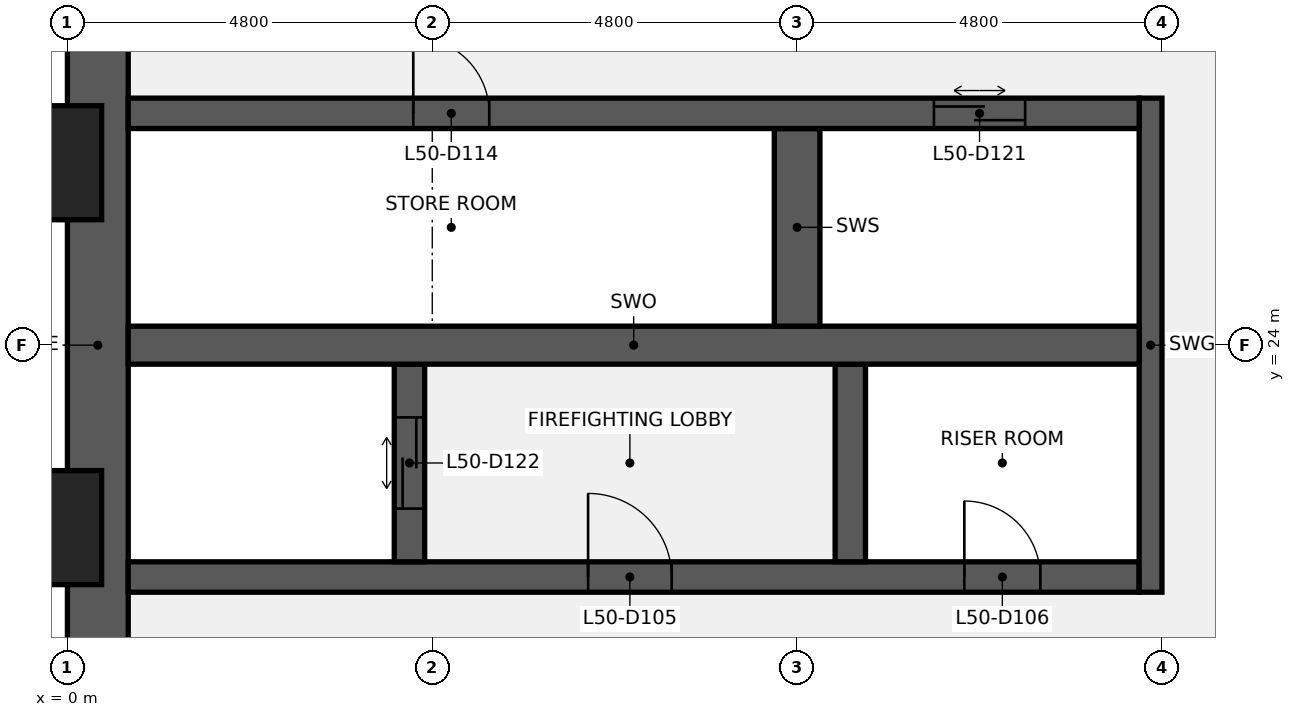
"""IFC4 building model, lengths in metres.
Left out: names, types, materials, properties, quantities, classifications, styles, units other than length and angle.
Written with IfcOpenShell. Run it as: python <this file> out.ifc"""

import sys

from ifc_helpers import new_model, si_unit, direction, frame, frame_2d, origin, origin_2d, place, context, subcontext, project, spatial, rectangle, extrude, element, fill, save


model = new_model("IFC4")
c1 = context("Model", 3, precision=1e-05, world=origin(), true_north=direction((0.0, 1.0)))
c2 = subcontext(c1, "Body", "Model", "MODEL_VIEW")
j1 = project(units=[si_unit("LENGTHUNIT", "METRE"), si_unit("PLANEANGLEUNIT", "RADIAN")], contexts=[c1])
p1 = place(None, origin())
s1 = spatial("IfcSite", under=j1, at=p1, CompositionType="ELEMENT")
p2 = place(p1, origin())
s2 = spatial("IfcBuilding", under=s1, at=p2, CompositionType="ELEMENT")
p3 = place(p2, frame((0.0, 0.0, 229.2)))
s3 = spatial("IfcBuildingStorey", under=s2, at=p3, CompositionType="ELEMENT", Elevation=229.2)
p4 = place(p3, frame((0.4, 9.6, 0.0), z_axis=(0.0, 0.0, 1.0), x_axis=(0.0, 1.0, 0.0)))
e1 = element("IfcWall", 1, at=p4, inside=s3, PredefinedType="SHEAR", context=c2, shape_type="SweptSolid", body=[
    extrude(rectangle(XDim=28.8, YDim=0.8, at=frame_2d((14.4, 0.0))), origin(), (0.0, 0.0, 1.0), 3.84),
])
p5 = place(p4, frame((8.85, 0.0, 0.9)))
e2 = element("IfcOpeningElement", 2, at=p5, cuts=e1, PredefinedType="OPENING", context=c2, shape_type="SweptSolid", body=[
    extrude(rectangle(XDim=1.5, YDim=1.5, at=frame_2d((0.75, 0.75))), frame((0.0, 0.41, 0.0), z_axis=(0.0, -1.0, 0.0), x_axis=(1.0, 0.0, 0.0)), (0.0, 0.0, 1.0), 0.82),
])
p6 = place(p4, frame((18.45, 0.0, 0.9)))
e3 = element("IfcOpeningElement", 3, at=p6, cuts=e1, PredefinedType="OPENING", context=c2, shape_type="SweptSolid", body=[
    extrude(rectangle(XDim=1.5, YDim=1.5, at=frame_2d((0.75, 0.75))), frame((0.0, 0.41, 0.0), z_axis=(0.0, -1.0, 0.0), x_axis=(1.0, 0.0, 0.0)), (0.0, 0.0, 1.0), 0.82),
])
p7 = place(p3, frame((0.8, 20.95, 0.0), z_axis=(0.0, 0.0, 1.0), x_axis=(1.0, 0.0, 0.0)))
e4 = element("IfcWall", 4, at=p7, inside=s3, PredefinedType="SHEAR", context=c2, shape_type="SweptSolid", body=[
    extrude(rectangle(XDim=13.3, YDim=0.4, at=frame_2d((6.65, 0.0))), origin(), (0.0, 0.0, 1.0), 3.84),
])
p8 = place(p7, frame((6.05, 0.0, 0.0)))
e5 = element("IfcOpeningElement", 5, at=p8, cuts=e4, PredefinedType="OPENING", context=c2, shape_type="SweptSolid", body=[
    extrude(rectangle(XDim=1.1, YDim=2.1, at=frame_2d((0.55, 1.05))), frame((0.0, 0.21, 0.0), z_axis=(0.0, -1.0, 0.0), x_axis=(1.0, 0.0, 0.0)), (0.0, 0.0, 1.0), 0.42),
])
p9 = place(p7, frame((11.0, 0.0, 0.0)))
e6 = element("IfcOpeningElement", 6, at=p9, cuts=e4, PredefinedType="OPENING", context=c2, shape_type="SweptSolid", body=[
    extrude(rectangle(XDim=1.0, YDim=2.1, at=frame_2d((0.5, 1.05))), frame((0.0, 0.21, 0.0), z_axis=(0.0, -1.0, 0.0), x_axis=(1.0, 0.0, 0.0)), (0.0, 0.0, 1.0), 0.42),
])
p10 = place(p3, frame((14.25, 20.75, 0.0), z_axis=(0.0, 0.0, 1.0), x_axis=(0.0, 1.0, 0.0)))
e7 = element("IfcWall", 7, at=p10, inside=s3, PredefinedType="SHEAR", context=c2, shape_type="SweptSolid", body=[
    extrude(rectangle(XDim=6.5, YDim=0.3, at=frame_2d((3.25, 0.0))), origin(), (0.0, 0.0, 1.0), 3.84),
])
p11 = place(p3, frame((4.5, 21.15, 0.0), z_axis=(0.0, 0.0, 1.0), x_axis=(0.0, 1.0, 0.0)))
e8 = element("IfcWall", 8, at=p11, inside=s3, PredefinedType="SHEAR", context=c2, shape_type="SweptSolid", body=[
    extrude(rectangle(XDim=2.6, YDim=0.4, at=frame_2d((1.3, 0.0))), origin(), (0.0, 0.0, 1.0), 3.84),
])
p12 = place(p11, frame((0.7, 0.0, 0.0)))
e9 = element("IfcOpeningElement", 9, at=p12, cuts=e8, PredefinedType="OPENING", context=c2, shape_type="SweptSolid", body=[
    extrude(rectangle(XDim=1.2, YDim=2.1, at=frame_2d((0.6, 1.05))), frame((0.0, 0.21, 0.0), z_axis=(0.0, -1.0, 0.0), x_axis=(1.0, 0.0, 0.0)), (0.0, 0.0, 1.0), 0.42),
])
p13 = place(p3, frame((10.3, 21.15, 0.0), z_axis=(0.0, 0.0, 1.0), x_axis=(0.0, 1.0, 0.0)))
e10 = element("IfcWall", 10, at=p13, inside=s3, PredefinedType="SHEAR", context=c2, shape_type="SweptSolid", body=[
    extrude(rectangle(XDim=2.6, YDim=0.4, at=frame_2d((1.3, 0.0))), origin(), (0.0, 0.0, 1.0), 3.84),
])
p14 = place(p3, frame((0.8, 24.0, 0.0), z_axis=(0.0, 0.0, 1.0), x_axis=(1.0, 0.0, 0.0)))
e11 = element("IfcWall", 11, at=p14, inside=s3, PredefinedType="SHEAR", context=c2, shape_type="SweptSolid", body=[
    extrude(rectangle(XDim=13.3, YDim=0.5, at=frame_2d((6.65, 0.0))), origin(), (0.0, 0.0, 1.0), 3.84),
])
p15 = place(p3, frame((9.6, 24.25, 0.0), z_axis=(0.0, 0.0, 1.0), x_axis=(0.0, 1.0, 0.0)))
e12 = element("IfcWall", 12, at=p15, inside=s3, PredefinedType="SHEAR", context=c2, shape_type="SweptSolid", body=[
    extrude(rectangle(XDim=2.6, YDim=0.6, at=frame_2d((1.3, 0.0))), origin(), (0.0, 0.0, 1.0), 3.84),
])
p16 = place(p3, frame((0.8, 27.05, 0.0), z_axis=(0.0, 0.0, 1.0), x_axis=(1.0, 0.0, 0.0)))
e13 = element("IfcWall", 13, at=p16, inside=s3, PredefinedType="SHEAR", context=c2, shape_type="SweptSolid", body=[
    extrude(rectangle(XDim=13.3, YDim=0.4, at=frame_2d((6.65, 0.0))), origin(), (0.0, 0.0, 1.0), 3.84),
])
p17 = place(p16, frame((3.75, 0.0, 0.0)))
e14 = element("IfcOpeningElement", 14, at=p17, cuts=e13, PredefinedType="OPENING", context=c2, shape_type="SweptSolid", body=[
    extrude(rectangle(XDim=1.0, YDim=2.1, at=frame_2d((0.5, 1.05))), frame((0.0, 0.21, 0.0), z_axis=(0.0, -1.0, 0.0), x_axis=(1.0, 0.0, 0.0)), (0.0, 0.0, 1.0), 0.42),
])
p18 = place(p16, frame((10.6, 0.0, 0.0)))
e15 = element("IfcOpeningElement", 15, at=p18, cuts=e13, PredefinedType="OPENING", context=c2, shape_type="SweptSolid", body=[
    extrude(rectangle(XDim=1.2, YDim=2.1, at=frame_2d((0.6, 1.05))), frame((0.0, 0.21, 0.0), z_axis=(0.0, -1.0, 0.0), x_axis=(1.0, 0.0, 0.0)), (0.0, 0.0, 1.0), 0.42),
])
for number, where, z_axis, x_axis in (
    (16, (-0.75, 21.6, 0.0), (0.0, 0.0, 1.0), (0.0, 1.0, 0.0)),
    (17, (-0.75, 26.4, 0.0), (0.0, 0.0, 1.0), (0.0, 1.0, 0.0)),
):
    element("IfcColumn", number, at=place(p3, frame(where, z_axis=z_axis, x_axis=x_axis)), inside=s3, PredefinedType="PILASTER", context=c2, shape_type="SweptSolid", body=[
        extrude(rectangle(XDim=2.4, YDim=1.5, at=origin_2d()), origin(), (0.0, 0.0, 1.0), 4.0),
    ])
p19 = place(p8, origin())
e18 = element("IfcDoor", 18, at=p19, inside=s3, OperationType="SINGLE_SWING_LEFT", PredefinedType="DOOR", context=c2, shape_type="SweptSolid", body=[
    extrude(rectangle(XDim=1.1, YDim=2.1, at=frame_2d((0.55, 1.05))), frame((0.0, 0.025, 0.0), z_axis=(0.0, -1.0, 0.0), x_axis=(1.0, 0.0, 0.0)), (0.0, 0.0, 1.0), 0.05),
])
fill(e5, e18)
p20 = place(p9, origin())
e19 = element("IfcDoor", 19, at=p20, inside=s3, OperationType="SINGLE_SWING_LEFT", PredefinedType="DOOR", context=c2, shape_type="SweptSolid", body=[
    extrude(rectangle(XDim=1.0, YDim=2.1, at=frame_2d((0.5, 1.05))), frame((0.0, 0.025, 0.0), z_axis=(0.0, -1.0, 0.0), x_axis=(1.0, 0.0, 0.0)), (0.0, 0.0, 1.0), 0.05),
])
fill(e6, e19)
p21 = place(p17, origin())
e20 = element("IfcDoor", 20, at=p21, inside=s3, OperationType="SINGLE_SWING_LEFT", PredefinedType="DOOR", context=c2, shape_type="SweptSolid", body=[
    extrude(rectangle(XDim=1.0, YDim=2.1, at=frame_2d((0.5, 1.05))), frame((0.0, 0.025, 0.0), z_axis=(0.0, -1.0, 0.0), x_axis=(1.0, 0.0, 0.0)), (0.0, 0.0, 1.0), 0.05),
])
fill(e14, e20)
p22 = place(p18, origin())
e21 = element("IfcDoor", 21, at=p22, inside=s3, OperationType="DOUBLE_DOOR_SLIDING", PredefinedType="DOOR", context=c2, shape_type="SweptSolid", body=[
    extrude(rectangle(XDim=1.2, YDim=2.1, at=frame_2d((0.6, 1.05))), frame((0.0, 0.025, 0.0), z_axis=(0.0, -1.0, 0.0), x_axis=(1.0, 0.0, 0.0)), (0.0, 0.0, 1.0), 0.05),
])
fill(e15, e21)
p23 = place(p12, origin())
e22 = element("IfcDoor", 22, at=p23, inside=s3, OperationType="DOUBLE_DOOR_SLIDING", PredefinedType="DOOR", context=c2, shape_type="SweptSolid", body=[
    extrude(rectangle(XDim=1.2, YDim=2.1, at=frame_2d((0.6, 1.05))), frame((0.0, 0.025, 0.0), z_axis=(0.0, -1.0, 0.0), x_axis=(1.0, 0.0, 0.0)), (0.0, 0.0, 1.0), 0.05),
])
fill(e9, e22)
save(model, sys.argv[1])
